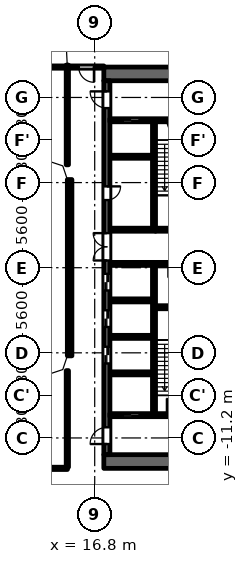
"""IFC4 building model, lengths in metres.
Left out: names, types, materials, properties, quantities, classifications, styles, units other than length and angle.
Written with IfcOpenShell. Run it as: python <this file> out.ifc"""

import sys

from ifc_helpers import new_model, si_unit, direction, frame, frame_2d, origin, place, context, subcontext, project, spatial, polyline, rectangle, outline, extrude, element, fill, save


model = new_model("IFC4")
c1 = context("Model", 3, precision=1e-05, world=origin(), true_north=direction((0.0, 1.0)))
c2 = subcontext(c1, "Body", "Model", "MODEL_VIEW")
j1 = project(units=[si_unit("LENGTHUNIT", "METRE"), si_unit("PLANEANGLEUNIT", "RADIAN")], contexts=[c1])
p1 = place(None, origin())
s1 = spatial("IfcSite", under=j1, at=p1, CompositionType="ELEMENT")
p2 = place(p1, origin())
s2 = spatial("IfcBuilding", under=s1, at=p2, CompositionType="ELEMENT")
p3 = place(p2, frame((0.0, 0.0, 11.3)))
s3 = spatial("IfcBuildingStorey", under=s2, at=p3, CompositionType="ELEMENT", Elevation=11.3)
p4 = place(p3, frame((15.15, 5.8, 0.0), z_axis=(0.0, 0.0, 1.0), x_axis=(0.0, -1.0, 0.0)))
e1 = element("IfcWall", 1, at=p4, inside=s3, PredefinedType="SOLIDWALL", context=c2, shape_type="SweptSolid", body=[
    extrude(rectangle(XDim=11.6, YDim=0.3, at=frame_2d((5.8, 0.0))), origin(), (0.0, 0.0, 1.0), 4.45),
])
p5 = place(p3, frame((20.7, 2.6, 0.0), z_axis=(0.0, 0.0, 1.0), x_axis=(0.0, 1.0, 0.0)))
e2 = element("IfcWall", 2, at=p5, inside=s3, PredefinedType="SHEAR", context=c2, shape_type="SweptSolid", body=[
    extrude(rectangle(XDim=7.0, YDim=0.2, at=frame_2d((3.5, 0.0))), origin(), (0.0, 0.0, 1.0), 4.45),
])
p6 = place(p3, frame((20.7, -9.6, 0.0), z_axis=(0.0, 0.0, 1.0), x_axis=(0.0, 1.0, 0.0)))
e3 = element("IfcWall", 3, at=p6, inside=s3, PredefinedType="SHEAR", context=c2, shape_type="SweptSolid", body=[
    extrude(rectangle(XDim=9.75, YDim=0.2, at=frame_2d((4.875, 0.0))), origin(), (0.0, 0.0, 1.0), 4.45),
])
p7 = place(p3, frame((20.8, 2.5, 0.0), z_axis=(0.0, 0.0, 1.0), x_axis=(1.0, 0.0, 0.0)))
e4 = element("IfcWall", 4, at=p7, inside=s3, PredefinedType="SHEAR", context=c2, shape_type="SweptSolid", body=[
    extrude(rectangle(XDim=5.3, YDim=0.2, at=frame_2d((2.65, 0.0))), origin(), (0.0, 0.0, 1.0), 4.45),
])
p8 = place(p7, frame((3.6, 0.0, 0.0)))
e5 = element("IfcOpeningElement", 5, at=p8, cuts=e4, PredefinedType="OPENING", context=c2, shape_type="SweptSolid", body=[
    extrude(rectangle(XDim=0.9, YDim=2.1, at=frame_2d((0.45, 1.05))), frame((0.0, 0.11, 0.0), z_axis=(0.0, -1.0, 0.0), x_axis=(1.0, 0.0, 0.0)), (0.0, 0.0, 1.0), 0.22),
])
p9 = place(p3, frame((20.8, 0.25, 0.0), z_axis=(0.0, 0.0, 1.0), x_axis=(1.0, 0.0, 0.0)))
e6 = element("IfcWall", 6, at=p9, inside=s3, PredefinedType="PARTITIONING", context=c2, shape_type="SweptSolid", body=[
    extrude(rectangle(XDim=5.3, YDim=0.2, at=frame_2d((2.65, 0.0))), origin(), (0.0, 0.0, 1.0), 4.45),
])
p10 = place(p9, frame((0.85, 0.0, 0.0)))
e7 = element("IfcOpeningElement", 7, at=p10, cuts=e6, PredefinedType="OPENING", context=c2, shape_type="SweptSolid", body=[
    extrude(rectangle(XDim=0.9, YDim=2.1, at=frame_2d((0.45, 1.05))), frame((0.0, 0.11, 0.0), z_axis=(0.0, -1.0, 0.0), x_axis=(1.0, 0.0, 0.0)), (0.0, 0.0, 1.0), 0.22),
])
p11 = place(p9, frame((3.6, 0.0, 0.0)))
e8 = element("IfcOpeningElement", 8, at=p11, cuts=e6, PredefinedType="OPENING", context=c2, shape_type="SweptSolid", body=[
    extrude(rectangle(XDim=0.9, YDim=2.1, at=frame_2d((0.45, 1.05))), frame((0.0, 0.11, 0.0), z_axis=(0.0, -1.0, 0.0), x_axis=(1.0, 0.0, 0.0)), (0.0, 0.0, 1.0), 0.22),
])
for number, where, z_axis, x_axis in (
    (9, (17.4, 12.75, 0.0), (0.0, 0.0, 1.0), (1.0, 0.0, 0.0)),
    (10, (17.4, -12.75, 0.0), (0.0, 0.0, 1.0), (1.0, 0.0, 0.0)),
):
    element("IfcWall", number, at=place(p3, frame(where, z_axis=z_axis, x_axis=x_axis)), inside=s3, PredefinedType="SHEAR", context=c2, shape_type="SweptSolid", body=[
        extrude(rectangle(XDim=10.4, YDim=0.9, at=frame_2d((5.2, 0.0))), origin(), (0.0, 0.0, 1.0), 4.45),
    ])
p12 = place(p3, frame((17.6, -12.3, 0.0), z_axis=(0.0, 0.0, 1.0), x_axis=(0.0, 1.0, 0.0)))
e11 = element("IfcWall", 11, at=p12, inside=s3, PredefinedType="SHEAR", context=c2, shape_type="SweptSolid", body=[
    extrude(rectangle(XDim=24.6, YDim=0.4, at=frame_2d((12.3, 0.0))), origin(), (0.0, 0.0, 1.0), 4.45),
])
p13 = place(p12, frame((6.0, 0.0, 0.0)))
e12 = element("IfcOpeningElement", 12, at=p13, cuts=e11, PredefinedType="OPENING", context=c2, shape_type="SweptSolid", body=[
    extrude(rectangle(XDim=1.1, YDim=2.1, at=frame_2d((0.55, 1.05))), frame((0.0, 0.21, 0.0), z_axis=(0.0, -1.0, 0.0), x_axis=(1.0, 0.0, 0.0)), (0.0, 0.0, 1.0), 0.42),
])
p14 = place(p12, frame((8.4, 0.0, 0.0)))
e13 = element("IfcOpeningElement", 13, at=p14, cuts=e11, PredefinedType="OPENING", context=c2, shape_type="SweptSolid", body=[
    extrude(rectangle(XDim=1.1, YDim=2.1, at=frame_2d((0.55, 1.05))), frame((0.0, 0.21, 0.0), z_axis=(0.0, -1.0, 0.0), x_axis=(1.0, 0.0, 0.0)), (0.0, 0.0, 1.0), 0.42),
])
p15 = place(p12, frame((10.8, 0.0, 0.0)))
e14 = element("IfcOpeningElement", 14, at=p15, cuts=e11, PredefinedType="OPENING", context=c2, shape_type="SweptSolid", body=[
    extrude(rectangle(XDim=1.1, YDim=2.1, at=frame_2d((0.55, 1.05))), frame((0.0, 0.21, 0.0), z_axis=(0.0, -1.0, 0.0), x_axis=(1.0, 0.0, 0.0)), (0.0, 0.0, 1.0), 0.42),
])
p16 = place(p12, frame((16.75, 0.0, 0.0)))
e15 = element("IfcOpeningElement", 15, at=p16, cuts=e11, PredefinedType="OPENING", context=c2, shape_type="SweptSolid", body=[
    extrude(rectangle(XDim=0.9, YDim=2.1, at=frame_2d((0.45, 1.05))), frame((0.0, 0.21, 0.0), z_axis=(0.0, -1.0, 0.0), x_axis=(1.0, 0.0, 0.0)), (0.0, 0.0, 1.0), 0.42),
])
p17 = place(p12, frame((22.8, 0.0, 0.0)))
e16 = element("IfcOpeningElement", 16, at=p17, cuts=e11, PredefinedType="OPENING", context=c2, shape_type="SweptSolid", body=[
    extrude(rectangle(XDim=1.1, YDim=2.1, at=frame_2d((0.55, 1.05))), frame((0.0, 0.21, 0.0), z_axis=(0.0, -1.0, 0.0), x_axis=(1.0, 0.0, 0.0)), (0.0, 0.0, 1.0), 0.42),
])
p18 = place(p12, frame((0.7, 0.0, 0.0)))
e17 = element("IfcOpeningElement", 17, at=p18, cuts=e11, PredefinedType="OPENING", context=c2, shape_type="SweptSolid", body=[
    extrude(rectangle(XDim=1.1, YDim=2.1, at=frame_2d((0.55, 1.05))), frame((0.0, 0.21, 0.0), z_axis=(0.0, -1.0, 0.0), x_axis=(1.0, 0.0, 0.0)), (0.0, 0.0, 1.0), 0.42),
])
p19 = place(p12, frame((12.775, 0.0, 0.0)))
e18 = element("IfcOpeningElement", 18, at=p19, cuts=e11, PredefinedType="OPENING", context=c2, shape_type="SweptSolid", body=[
    extrude(rectangle(XDim=1.8, YDim=2.1, at=frame_2d((0.9, 1.05))), frame((0.0, 0.21, 0.0), z_axis=(0.0, -1.0, 0.0), x_axis=(1.0, 0.0, 0.0)), (0.0, 0.0, 1.0), 0.42),
])
p20 = place(p3, frame((17.8, -9.7, 0.0), z_axis=(0.0, 0.0, 1.0), x_axis=(1.0, 0.0, 0.0)))
e19 = element("IfcWall", 19, at=p20, inside=s3, PredefinedType="SHEAR", context=c2, shape_type="SweptSolid", body=[
    extrude(rectangle(XDim=8.3, YDim=0.2, at=frame_2d((4.15, 0.0))), origin(), (0.0, 0.0, 1.0), 4.45),
])
p21 = place(p20, frame((0.85, 0.0, 0.0)))
e20 = element("IfcOpeningElement", 20, at=p21, cuts=e19, PredefinedType="OPENING", context=c2, shape_type="SweptSolid", body=[
    extrude(rectangle(XDim=1.1, YDim=2.1, at=frame_2d((0.55, 1.05))), frame((0.0, 0.11, 0.0), z_axis=(0.0, -1.0, 0.0), x_axis=(1.0, 0.0, 0.0)), (0.0, 0.0, 1.0), 0.22),
])
p22 = place(p20, frame((3.75, 0.0, 0.0)))
e21 = element("IfcOpeningElement", 21, at=p22, cuts=e19, PredefinedType="OPENING", context=c2, shape_type="SweptSolid", body=[
    extrude(rectangle(XDim=1.1, YDim=2.1, at=frame_2d((0.55, 1.05))), frame((0.0, 0.11, 0.0), z_axis=(0.0, -1.0, 0.0), x_axis=(1.0, 0.0, 0.0)), (0.0, 0.0, 1.0), 0.22),
])
for number, where, z_axis, x_axis in (
    (22, (17.8, -6.95, 0.0), (0.0, 0.0, 1.0), (1.0, 0.0, 0.0)),
    (23, (17.8, -4.55, 0.0), (0.0, 0.0, 1.0), (1.0, 0.0, 0.0)),
    (24, (17.8, -2.15, 0.0), (0.0, 0.0, 1.0), (1.0, 0.0, 0.0)),
):
    element("IfcWall", number, at=place(p3, frame(where, z_axis=z_axis, x_axis=x_axis)), inside=s3, PredefinedType="PARTITIONING", context=c2, shape_type="SweptSolid", body=[
        extrude(rectangle(XDim=2.8, YDim=0.2, at=frame_2d((1.4, 0.0))), origin(), (0.0, 0.0, 1.0), 4.45),
    ])
for number, where, z_axis, x_axis in (
    (25, (17.8, 0.25, 0.0), (0.0, 0.0, 1.0), (1.0, 0.0, 0.0)),
    (26, (17.8, 2.5, 0.0), (0.0, 0.0, 1.0), (1.0, 0.0, 0.0)),
):
    element("IfcWall", number, at=place(p3, frame(where, z_axis=z_axis, x_axis=x_axis)), inside=s3, PredefinedType="PARTITIONING", context=c2, shape_type="SweptSolid", body=[
        extrude(rectangle(XDim=3.0, YDim=0.2, at=frame_2d((1.5, 0.0))), origin(), (0.0, 0.0, 1.0), 4.45),
    ])
p23 = place(p3, frame((17.8, 7.3, 0.0), z_axis=(0.0, 0.0, 1.0), x_axis=(1.0, 0.0, 0.0)))
e27 = element("IfcWall", 27, at=p23, inside=s3, PredefinedType="PARTITIONING", context=c2, shape_type="SweptSolid", body=[
    extrude(rectangle(XDim=2.8, YDim=0.2, at=frame_2d((1.4, 0.0))), origin(), (0.0, 0.0, 1.0), 4.45),
])
p24 = place(p3, frame((17.8, 9.7, 0.0), z_axis=(0.0, 0.0, 1.0), x_axis=(1.0, 0.0, 0.0)))
e28 = element("IfcWall", 28, at=p24, inside=s3, PredefinedType="SHEAR", context=c2, shape_type="SweptSolid", body=[
    extrude(rectangle(XDim=8.3, YDim=0.2, at=frame_2d((4.15, 0.0))), origin(), (0.0, 0.0, 1.0), 4.45),
])
p25 = place(p24, frame((0.85, 0.0, 0.0)))
e29 = element("IfcOpeningElement", 29, at=p25, cuts=e28, PredefinedType="OPENING", context=c2, shape_type="SweptSolid", body=[
    extrude(rectangle(XDim=1.1, YDim=2.1, at=frame_2d((0.55, 1.05))), frame((0.0, 0.11, 0.0), z_axis=(0.0, -1.0, 0.0), x_axis=(1.0, 0.0, 0.0)), (0.0, 0.0, 1.0), 0.22),
])
p26 = place(p24, frame((3.75, 0.0, 0.0)))
e30 = element("IfcOpeningElement", 30, at=p26, cuts=e28, PredefinedType="OPENING", context=c2, shape_type="SweptSolid", body=[
    extrude(rectangle(XDim=1.1, YDim=2.1, at=frame_2d((0.55, 1.05))), frame((0.0, 0.11, 0.0), z_axis=(0.0, -1.0, 0.0), x_axis=(1.0, 0.0, 0.0)), (0.0, 0.0, 1.0), 0.22),
])
p27 = place(p3, frame((20.8, -2.6, 0.0), z_axis=(0.0, 0.0, 1.0), x_axis=(1.0, 0.0, 0.0)))
e31 = element("IfcWall", 31, at=p27, inside=s3, PredefinedType="SHEAR", context=c2, shape_type="SweptSolid", body=[
    extrude(rectangle(XDim=2.8, YDim=0.2, at=frame_2d((1.4, 0.0))), origin(), (0.0, 0.0, 1.0), 4.45),
])
p28 = place(p3, frame((-15.005, -13.2, 0.0), z_axis=(0.0, 0.0, 1.0), x_axis=(1.0, 0.0, 0.0)))
e32 = element("IfcWall", 32, at=p28, inside=s3, PredefinedType="PARTITIONING", context=c2, shape_type="SweptSolid", body=[
    extrude(rectangle(XDim=30.01, YDim=0.15, at=frame_2d((15.005, 0.0))), origin(), (0.0, 0.0, 1.0), 4.45),
])
p29 = place(p28, frame((16.855, 0.0, 0.0)))
e33 = element("IfcOpeningElement", 33, at=p29, cuts=e32, PredefinedType="OPENING", context=c2, shape_type="SweptSolid", body=[
    extrude(rectangle(XDim=1.8, YDim=2.1, at=frame_2d((0.9, 1.05))), frame((0.0, 0.085, 0.0), z_axis=(0.0, -1.0, 0.0), x_axis=(1.0, 0.0, 0.0)), (0.0, 0.0, 1.0), 0.17),
])
p30 = place(p3, frame((-17.4, 13.2, 0.0), z_axis=(0.0, 0.0, 1.0), x_axis=(1.0, 0.0, 0.0)))
e34 = element("IfcWall", 34, at=p30, inside=s3, PredefinedType="PARTITIONING", context=c2, shape_type="SweptSolid", body=[
    extrude(rectangle(XDim=34.8, YDim=0.15, at=frame_2d((17.4, 0.0))), origin(), (0.0, 0.0, 1.0), 4.45),
])
p31 = place(p30, frame((3.05, 0.0, 0.0)))
e35 = element("IfcOpeningElement", 35, at=p31, cuts=e34, PredefinedType="OPENING", context=c2, shape_type="SweptSolid", body=[
    extrude(rectangle(XDim=1.8, YDim=2.1, at=frame_2d((0.9, 1.05))), frame((0.0, 0.085, 0.0), z_axis=(0.0, -1.0, 0.0), x_axis=(1.0, 0.0, 0.0)), (0.0, 0.0, 1.0), 0.17),
])
p32 = place(p30, frame((0.75, 0.0, 0.0)))
e36 = element("IfcOpeningElement", 36, at=p32, cuts=e34, PredefinedType="OPENING", context=c2, shape_type="SweptSolid", body=[
    extrude(rectangle(XDim=1.0, YDim=2.1, at=frame_2d((0.5, 1.05))), frame((0.0, 0.085, 0.0), z_axis=(0.0, -1.0, 0.0), x_axis=(1.0, 0.0, 0.0)), (0.0, 0.0, 1.0), 0.17),
])
p33 = place(p30, frame((33.15, 0.0, 0.0)))
e37 = element("IfcOpeningElement", 37, at=p33, cuts=e34, PredefinedType="OPENING", context=c2, shape_type="SweptSolid", body=[
    extrude(rectangle(XDim=1.0, YDim=2.1, at=frame_2d((0.5, 1.05))), frame((0.0, 0.085, 0.0), z_axis=(0.0, -1.0, 0.0), x_axis=(1.0, 0.0, 0.0)), (0.0, 0.0, 1.0), 0.17),
])
for number, where, z_axis, x_axis in (
    (38, (15.0, -13.125, 0.0), (0.0, 0.0, 1.0), (0.0, 1.0, 0.0)),
    (39, (15.0, 6.769, 0.0), (0.0, 0.0, 1.0), (0.0, 1.0, 0.0)),
):
    element("IfcWall", number, at=place(p3, frame(where, z_axis=z_axis, x_axis=x_axis)), inside=s3, PredefinedType="PARTITIONING", context=c2, shape_type="SweptSolid", body=[
        extrude(rectangle(XDim=6.356, YDim=0.15, at=frame_2d((3.178, 0.0))), origin(), (0.0, 0.0, 1.0), 4.45),
    ])
p34 = place(p3, origin())
e40 = element("IfcWall", 40, at=p34, inside=s3, PredefinedType="SOLIDWALL", context=c2, shape_type="SweptSolid", body=[
    extrude(outline(polyline([(14.937, 6.937), (13.849, 7.3), (13.8, 7.3), (13.8, 7.0), (14.7, 6.7), (15.0, 5.8), (15.3, 5.8), (15.3, 5.849), (14.937, 6.937)])), origin(), (0.0, 0.0, 1.0), 4.45),
])
e41 = element("IfcWall", 41, at=p34, inside=s3, PredefinedType="SOLIDWALL", context=c2, shape_type="SweptSolid", body=[
    extrude(outline(polyline([(14.937, -6.937), (15.3, -5.849), (15.3, -5.8), (15.0, -5.8), (14.7, -6.7), (13.8, -7.0), (13.8, -7.3), (13.849, -7.3), (14.937, -6.937)])), origin(), (0.0, 0.0, 1.0), 4.45),
])
p35 = place(p21, origin())
e42 = element("IfcDoor", 42, at=p35, inside=s3, OperationType="DOUBLE_DOOR_SLIDING", PredefinedType="DOOR", context=c2, shape_type="SweptSolid", body=[
    extrude(rectangle(XDim=1.1, YDim=2.1, at=frame_2d((0.55, 1.05))), frame((0.0, 0.025, 0.0), z_axis=(0.0, -1.0, 0.0), x_axis=(1.0, 0.0, 0.0)), (0.0, 0.0, 1.0), 0.05),
])
fill(e20, e42)
p36 = place(p13, origin())
e43 = element("IfcDoor", 43, at=p36, inside=s3, OperationType="DOUBLE_DOOR_SLIDING", PredefinedType="DOOR", context=c2, shape_type="SweptSolid", body=[
    extrude(rectangle(XDim=1.1, YDim=2.1, at=frame_2d((0.55, 1.05))), frame((0.0, 0.025, 0.0), z_axis=(0.0, -1.0, 0.0), x_axis=(1.0, 0.0, 0.0)), (0.0, 0.0, 1.0), 0.05),
])
fill(e12, e43)
p37 = place(p14, origin())
e44 = element("IfcDoor", 44, at=p37, inside=s3, OperationType="DOUBLE_DOOR_SLIDING", PredefinedType="DOOR", context=c2, shape_type="SweptSolid", body=[
    extrude(rectangle(XDim=1.1, YDim=2.1, at=frame_2d((0.55, 1.05))), frame((0.0, 0.025, 0.0), z_axis=(0.0, -1.0, 0.0), x_axis=(1.0, 0.0, 0.0)), (0.0, 0.0, 1.0), 0.05),
])
fill(e13, e44)
p38 = place(p15, origin())
e45 = element("IfcDoor", 45, at=p38, inside=s3, OperationType="DOUBLE_DOOR_SLIDING", PredefinedType="DOOR", context=c2, shape_type="SweptSolid", body=[
    extrude(rectangle(XDim=1.1, YDim=2.1, at=frame_2d((0.55, 1.05))), frame((0.0, 0.025, 0.0), z_axis=(0.0, -1.0, 0.0), x_axis=(1.0, 0.0, 0.0)), (0.0, 0.0, 1.0), 0.05),
])
fill(e14, e45)
p39 = place(p16, origin())
e46 = element("IfcDoor", 46, at=p39, inside=s3, OperationType="SINGLE_SWING_RIGHT", PredefinedType="DOOR", context=c2, shape_type="SweptSolid", body=[
    extrude(rectangle(XDim=0.9, YDim=2.1, at=frame_2d((0.45, 1.05))), frame((0.0, 0.025, 0.0), z_axis=(0.0, -1.0, 0.0), x_axis=(1.0, 0.0, 0.0)), (0.0, 0.0, 1.0), 0.05),
])
fill(e15, e46)
p40 = place(p25, origin())
e47 = element("IfcDoor", 47, at=p40, inside=s3, OperationType="DOUBLE_DOOR_SLIDING", PredefinedType="DOOR", context=c2, shape_type="SweptSolid", body=[
    extrude(rectangle(XDim=1.1, YDim=2.1, at=frame_2d((0.55, 1.05))), frame((0.0, 0.025, 0.0), z_axis=(0.0, -1.0, 0.0), x_axis=(1.0, 0.0, 0.0)), (0.0, 0.0, 1.0), 0.05),
])
fill(e29, e47)
p41 = place(p17, origin())
e48 = element("IfcDoor", 48, at=p41, inside=s3, OperationType="SINGLE_SWING_LEFT", PredefinedType="DOOR", context=c2, shape_type="SweptSolid", body=[
    extrude(rectangle(XDim=1.1, YDim=2.1, at=frame_2d((0.55, 1.05))), frame((0.0, 0.025, 0.0), z_axis=(0.0, -1.0, 0.0), x_axis=(1.0, 0.0, 0.0)), (0.0, 0.0, 1.0), 0.05),
])
fill(e16, e48)
p42 = place(p18, origin())
e49 = element("IfcDoor", 49, at=p42, inside=s3, OperationType="SINGLE_SWING_RIGHT", PredefinedType="DOOR", context=c2, shape_type="SweptSolid", body=[
    extrude(rectangle(XDim=1.1, YDim=2.1, at=frame_2d((0.55, 1.05))), frame((0.0, 0.025, 0.0), z_axis=(0.0, -1.0, 0.0), x_axis=(1.0, 0.0, 0.0)), (0.0, 0.0, 1.0), 0.05),
])
fill(e17, e49)
p43 = place(p26, origin())
e50 = element("IfcDoor", 50, at=p43, inside=s3, OperationType="SINGLE_SWING_RIGHT", PredefinedType="DOOR", context=c2, shape_type="SweptSolid", body=[
    extrude(rectangle(XDim=1.1, YDim=2.1, at=frame_2d((0.55, 1.05))), frame((0.0, 0.025, 0.0), z_axis=(0.0, -1.0, 0.0), x_axis=(1.0, 0.0, 0.0)), (0.0, 0.0, 1.0), 0.05),
])
fill(e30, e50)
p44 = place(p22, origin())
e51 = element("IfcDoor", 51, at=p44, inside=s3, OperationType="SINGLE_SWING_RIGHT", PredefinedType="DOOR", context=c2, shape_type="SweptSolid", body=[
    extrude(rectangle(XDim=1.1, YDim=2.1, at=frame_2d((0.55, 1.05))), frame((0.0, 0.025, 0.0), z_axis=(0.0, -1.0, 0.0), x_axis=(1.0, 0.0, 0.0)), (0.0, 0.0, 1.0), 0.05),
])
fill(e21, e51)
p45 = place(p19, origin())
e52 = element("IfcDoor", 52, at=p45, inside=s3, OperationType="DOUBLE_DOOR_SINGLE_SWING", PredefinedType="DOOR", context=c2, shape_type="SweptSolid", body=[
    extrude(rectangle(XDim=1.8, YDim=2.1, at=frame_2d((0.9, 1.05))), frame((0.0, 0.025, 0.0), z_axis=(0.0, -1.0, 0.0), x_axis=(1.0, 0.0, 0.0)), (0.0, 0.0, 1.0), 0.05),
])
fill(e18, e52)
p46 = place(p33, origin())
e53 = element("IfcDoor", 53, at=p46, inside=s3, OperationType="SINGLE_SWING_RIGHT", PredefinedType="DOOR", context=c2, shape_type="SweptSolid", body=[
    extrude(rectangle(XDim=1.0, YDim=2.1, at=frame_2d((0.5, 1.05))), frame((0.0, 0.025, 0.0), z_axis=(0.0, -1.0, 0.0), x_axis=(1.0, 0.0, 0.0)), (0.0, 0.0, 1.0), 0.05),
])
fill(e37, e53)
save(model, sys.argv[1])
